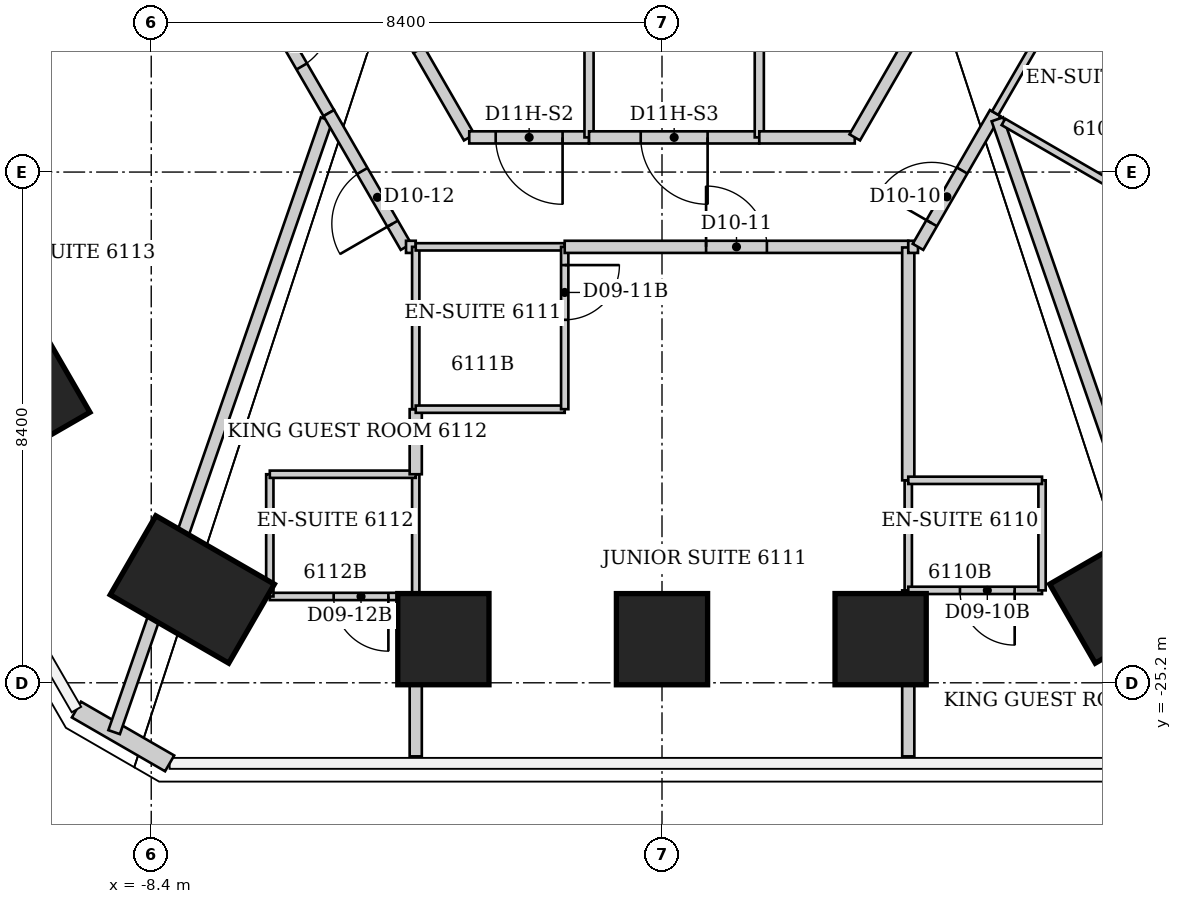
"""IFC4 building model, lengths in metres.
Left out: names, types, materials, properties, quantities, classifications, styles, units other than length and angle.
Written with IfcOpenShell. Run it as: python <this file> out.ifc"""

import sys

from ifc_helpers import new_model, si_unit, direction, frame, frame_2d, origin, origin_2d, place, context, subcontext, project, spatial, rectangle, extrude, element, fill, save


model = new_model("IFC4")
c1 = context("Model", 3, precision=1e-05, world=origin(), true_north=direction((0.0, 1.0)))
c2 = subcontext(c1, "Body", "Model", "MODEL_VIEW")
j1 = project(units=[si_unit("LENGTHUNIT", "METRE"), si_unit("PLANEANGLEUNIT", "RADIAN")], contexts=[c1])
p1 = place(None, origin())
s1 = spatial("IfcSite", under=j1, at=p1, CompositionType="ELEMENT")
p2 = place(p1, origin())
s2 = spatial("IfcBuilding", under=s1, at=p2, CompositionType="ELEMENT")
p3 = place(p2, frame((0.0, 0.0, 244.0)))
s3 = spatial("IfcBuildingStorey", under=s2, at=p3, CompositionType="ELEMENT", Elevation=244.0)
p4 = place(p3, frame((7.725, -23.665, 0.0), z_axis=(-0.022045010904, 0.06754488806, 0.997472659069), x_axis=(0.499636222159, -0.863441852085, 0.069511247833)))
e1 = element("IfcColumn", 1, at=p4, inside=s3, PredefinedType="COLUMN", context=c2, shape_type="SweptSolid", body=[
    extrude(rectangle(XDim=1.5, YDim=2.25, at=origin_2d()), origin(), (0.0, 0.0, 1.0), 3.81),
])
p5 = place(p3, frame((3.595, -24.482, 0.0), z_axis=(-0.009998694988, 0.068132133153, 0.997626201806), x_axis=(-0.000785320082, -0.997676301199, 0.068127683793)))
e2 = element("IfcColumn", 2, at=p5, inside=s3, PredefinedType="COLUMN", context=c2, shape_type="SweptSolid", body=[
    extrude(rectangle(XDim=1.5, YDim=1.5, at=origin_2d()), origin(), (0.0, 0.0, 1.0), 3.809),
])
p6 = place(p3, frame((0.0, -24.483, 0.0), z_axis=(0.0, 0.068135539126, 0.997676073838), x_axis=(0.0, -0.997676073838, 0.068135539126)))
e3 = element("IfcColumn", 3, at=p6, inside=s3, PredefinedType="COLUMN", context=c2, shape_type="SweptSolid", body=[
    extrude(rectangle(XDim=1.5, YDim=1.5, at=origin_2d()), origin(), (0.0, 0.0, 1.0), 3.809),
])
p7 = place(p3, frame((-3.595, -24.482, 0.0), z_axis=(0.009998694988, 0.068132133153, 0.997626201806), x_axis=(0.000785320082, -0.997676301199, 0.068127683793)))
e4 = element("IfcColumn", 4, at=p7, inside=s3, PredefinedType="COLUMN", context=c2, shape_type="SweptSolid", body=[
    extrude(rectangle(XDim=1.5, YDim=1.5, at=origin_2d()), origin(), (0.0, 0.0, 1.0), 3.809),
])
p8 = place(p3, frame((-7.725, -23.665, 0.0), z_axis=(0.022045010904, 0.06754488806, 0.997472659069), x_axis=(-0.499636222159, -0.863441852085, 0.069511247833)))
e5 = element("IfcColumn", 5, at=p8, inside=s3, PredefinedType="COLUMN", context=c2, shape_type="SweptSolid", body=[
    extrude(rectangle(XDim=1.5, YDim=2.25, at=origin_2d()), origin(), (0.0, 0.0, 1.0), 3.81),
])
p9 = place(p3, frame((-10.433, -20.476, 0.0), z_axis=(0.02955498868, 0.05795598648, 0.997881559242), x_axis=(-0.865880688817, -0.49727005386, 0.054526381384)))
e6 = element("IfcColumn", 6, at=p9, inside=s3, PredefinedType="COLUMN", context=c2, shape_type="SweptSolid", body=[
    extrude(rectangle(XDim=1.5, YDim=1.5, at=origin_2d()), origin(), (0.0, 0.0, 1.0), 3.808),
])
p10 = place(p3, frame((-8.097, -26.525, 0.0), z_axis=(0.0, 0.0, 1.0), x_axis=(-0.866036293601, 0.499981137809, 0.0)))
e7 = element("IfcWall", 7, at=p10, inside=s3, PredefinedType="SOLIDWALL", context=c2, shape_type="SweptSolid", body=[
    extrude(rectangle(XDim=1.77, YDim=0.3, at=frame_2d((0.885, 0.0))), origin(), (0.0, 0.0, 1.0), 3.64),
])
p11 = place(p3, frame((-9.01, -26.012, 0.0), z_axis=(0.0, 0.0, 1.0), x_axis=(0.327582991606, 0.944822408504, 0.0)))
e8 = element("IfcWall", 8, at=p11, inside=s3, PredefinedType="PARTITIONING", context=c2, shape_type="SweptSolid", body=[
    extrude(rectangle(XDim=10.667, YDim=0.2, at=frame_2d((5.333, 0.0))), origin(), (0.0, 0.0, 1.0), 3.64),
])
p12 = place(p3, frame((-6.87, -13.43, 0.0), z_axis=(0.0, 0.0, 1.0), x_axis=(0.501192399481, -0.865335876237, 0.0)))
e9 = element("IfcWall", 9, at=p12, inside=s3, PredefinedType="PARTITIONING", context=c2, shape_type="SweptSolid", body=[
    extrude(rectangle(XDim=2.774, YDim=0.2, at=frame_2d((1.387, 0.0))), origin(), (0.0, 0.0, 1.0), 3.64),
])
p13 = place(p12, frame((0.887, 0.0, 0.0)))
e10 = element("IfcOpeningElement", 10, at=p13, cuts=e9, PredefinedType="OPENING", context=c2, shape_type="SweptSolid", body=[
    extrude(rectangle(XDim=1.0, YDim=2.13, at=frame_2d((0.5, 1.065))), frame((0.0, 0.1, 0.0), z_axis=(0.0, -1.0, 0.0), x_axis=(1.0, 0.0, 0.0)), (0.0, 0.0, 1.0), 0.2),
])
p14 = place(p3, frame((-6.45, -23.78, 0.0), z_axis=(0.0, 0.0, 1.0), x_axis=(1.0, 0.0, 0.0)))
e11 = element("IfcWall", 11, at=p14, inside=s3, PredefinedType="PARTITIONING", context=c2, shape_type="SweptSolid", body=[
    extrude(rectangle(XDim=2.4, YDim=0.12, at=frame_2d((1.2, 0.0))), origin(), (0.0, 0.0, 1.0), 2.14),
])
p15 = place(p14, frame((1.05, 0.0, 0.0)))
e12 = element("IfcOpeningElement", 12, at=p15, cuts=e11, PredefinedType="OPENING", context=c2, shape_type="SweptSolid", body=[
    extrude(rectangle(XDim=0.9, YDim=2.03, at=frame_2d((0.45, 1.015))), frame((0.0, 0.06, 0.0), z_axis=(0.0, -1.0, 0.0), x_axis=(1.0, 0.0, 0.0)), (0.0, 0.0, 1.0), 0.12),
])
p16 = place(p3, frame((-6.45, -21.77, 0.0), z_axis=(0.0, 0.0, 1.0), x_axis=(0.0, -1.0, 0.0)))
e13 = element("IfcWall", 13, at=p16, inside=s3, PredefinedType="PARTITIONING", context=c2, shape_type="SweptSolid", body=[
    extrude(rectangle(XDim=2.01, YDim=0.12, at=frame_2d((1.005, 0.0))), origin(), (0.0, 0.0, 1.0), 3.64),
])
p17 = place(p3, frame((-5.48, -15.83, 0.0), z_axis=(0.0, 0.0, 1.0), x_axis=(0.499963722229, -0.866046347752, 0.0)))
e14 = element("IfcWall", 14, at=p17, inside=s3, PredefinedType="PARTITIONING", context=c2, shape_type="SweptSolid", body=[
    extrude(rectangle(XDim=2.54, YDim=0.2, at=frame_2d((1.27, 0.0))), origin(), (0.0, 0.0, 1.0), 3.64),
])
p18 = place(p17, frame((1.1, 0.0, 0.0)))
e15 = element("IfcOpeningElement", 15, at=p18, cuts=e14, PredefinedType="OPENING", context=c2, shape_type="SweptSolid", body=[
    extrude(rectangle(XDim=1.0, YDim=2.13, at=frame_2d((0.5, 1.065))), frame((0.0, 0.1, 0.0), z_axis=(0.0, -1.0, 0.0), x_axis=(1.0, 0.0, 0.0)), (0.0, 0.0, 1.0), 0.2),
])
p19 = place(p3, frame((-4.21, -18.03, 0.0), z_axis=(0.0, 0.0, 1.0), x_axis=(1.0, 0.0, 0.0)))
e16 = element("IfcWall", 16, at=p19, inside=s3, PredefinedType="PARTITIONING", context=c2, shape_type="SweptSolid", body=[
    extrude(rectangle(XDim=0.16, YDim=0.2, at=frame_2d((0.08, 0.0))), origin(), (0.0, 0.0, 1.0), 3.64),
])
p20 = place(p3, frame((-4.05, -26.41, 0.0), z_axis=(0.0, 0.0, 1.0), x_axis=(0.0, 1.0, 0.0)))
e17 = element("IfcWall", 17, at=p20, inside=s3, PredefinedType="PARTITIONING", context=c2, shape_type="SweptSolid", body=[
    extrude(rectangle(XDim=2.63, YDim=0.2, at=frame_2d((1.315, 0.0))), origin(), (0.0, 0.0, 1.0), 3.64),
])
p21 = place(p3, frame((-4.05, -23.78, 0.0), z_axis=(0.0, 0.0, 1.0), x_axis=(0.0, 1.0, 0.0)))
e18 = element("IfcWall", 18, at=p21, inside=s3, PredefinedType="PARTITIONING", context=c2, shape_type="SweptSolid", body=[
    extrude(rectangle(XDim=2.01, YDim=0.12, at=frame_2d((1.005, 0.0))), origin(), (0.0, 0.0, 1.0), 3.64),
])
p22 = place(p3, frame((-4.05, -21.77, 0.0), z_axis=(0.0, 0.0, 1.0), x_axis=(-1.0, 0.0, 0.0)))
e19 = element("IfcWall", 19, at=p22, inside=s3, PredefinedType="PARTITIONING", context=c2, shape_type="SweptSolid", body=[
    extrude(rectangle(XDim=2.4, YDim=0.12, at=frame_2d((1.2, 0.0))), origin(), (0.0, 0.0, 1.0), 3.64),
])
p23 = place(p3, frame((-4.05, -21.77, 0.0), z_axis=(0.0, 0.0, 1.0), x_axis=(0.0, 1.0, 0.0)))
e20 = element("IfcWall", 20, at=p23, inside=s3, PredefinedType="PARTITIONING", context=c2, shape_type="SweptSolid", body=[
    extrude(rectangle(XDim=1.07, YDim=0.2, at=frame_2d((0.535, 0.0))), origin(), (0.0, 0.0, 1.0), 3.64),
])
p24 = place(p3, frame((-4.05, -20.7, 0.0), z_axis=(0.0, 0.0, 1.0), x_axis=(0.0, 1.0, 0.0)))
e21 = element("IfcWall", 21, at=p24, inside=s3, PredefinedType="PARTITIONING", context=c2, shape_type="SweptSolid", body=[
    extrude(rectangle(XDim=2.67, YDim=0.12, at=frame_2d((1.335, 0.0))), origin(), (0.0, 0.0, 1.0), 3.64),
])
for number, where, z_axis, x_axis in (
    (22, (-4.05, -20.7, 0.0), (0.0, 0.0, 1.0), (1.0, 0.0, 0.0)),
    (23, (-4.05, -18.03, 0.0), (0.0, 0.0, 1.0), (1.0, 0.0, 0.0)),
):
    element("IfcWall", number, at=place(p3, frame(where, z_axis=z_axis, x_axis=x_axis)), inside=s3, PredefinedType="PARTITIONING", context=c2, shape_type="SweptSolid", body=[
        extrude(rectangle(XDim=2.45, YDim=0.12, at=frame_2d((1.225, 0.0))), origin(), (0.0, 0.0, 1.0), 3.64),
    ])
p25 = place(p3, frame((-4.0, -14.79, 0.0), z_axis=(0.0, 0.0, 1.0), x_axis=(-0.499916512745, 0.866073599808, 0.0)))
e24 = element("IfcWall", 24, at=p25, inside=s3, PredefinedType="PARTITIONING", context=c2, shape_type="SweptSolid", body=[
    extrude(rectangle(XDim=8.821, YDim=0.2, at=frame_2d((4.411, 0.0))), origin(), (0.0, 0.0, 1.0), 3.64),
])
p26 = place(p25, frame((3.861, 0.0, 0.0)))
e25 = element("IfcOpeningElement", 25, at=p26, cuts=e24, PredefinedType="OPENING", context=c2, shape_type="SweptSolid", body=[
    extrude(rectangle(XDim=1.1, YDim=2.2, at=frame_2d((0.55, 1.1))), frame((0.0, 0.1, 0.0), z_axis=(0.0, -1.0, 0.0), x_axis=(1.0, 0.0, 0.0)), (0.0, 0.0, 1.0), 0.2),
])
p27 = place(p3, frame((-3.17, -16.23, 0.0), z_axis=(0.0, 0.0, 1.0), x_axis=(-0.499425709803, 0.866356716594, 0.0)))
e26 = element("IfcWall", 26, at=p27, inside=s3, PredefinedType="PARTITIONING", context=c2, shape_type="SweptSolid", body=[
    extrude(rectangle(XDim=1.662, YDim=0.2, at=frame_2d((0.831, 0.0))), origin(), (0.0, 0.0, 1.0), 3.64),
])
p28 = place(p3, frame((-1.6, -20.7, 0.0), z_axis=(0.0, 0.0, 1.0), x_axis=(0.0, 1.0, 0.0)))
e27 = element("IfcWall", 27, at=p28, inside=s3, PredefinedType="PARTITIONING", context=c2, shape_type="SweptSolid", body=[
    extrude(rectangle(XDim=2.67, YDim=0.12, at=frame_2d((1.335, 0.0))), origin(), (0.0, 0.0, 1.0), 3.64),
])
p29 = place(p28, frame((1.47, 0.0, 0.0)))
e28 = element("IfcOpeningElement", 28, at=p29, cuts=e27, PredefinedType="OPENING", context=c2, shape_type="SweptSolid", body=[
    extrude(rectangle(XDim=0.9, YDim=2.03, at=frame_2d((0.45, 1.015))), frame((0.0, 0.06, 0.0), z_axis=(0.0, -1.0, 0.0), x_axis=(1.0, 0.0, 0.0)), (0.0, 0.0, 1.0), 0.12),
])
p30 = place(p3, frame((-1.6, -18.03, 0.0), z_axis=(0.0, 0.0, 1.0), x_axis=(1.0, 0.0, 0.0)))
e29 = element("IfcWall", 29, at=p30, inside=s3, PredefinedType="PARTITIONING", context=c2, shape_type="SweptSolid", body=[
    extrude(rectangle(XDim=5.65, YDim=0.2, at=frame_2d((2.825, 0.0))), origin(), (0.0, 0.0, 1.0), 3.64),
])
p31 = place(p30, frame((2.325, 0.0, 0.0)))
e30 = element("IfcOpeningElement", 30, at=p31, cuts=e29, PredefinedType="OPENING", context=c2, shape_type="SweptSolid", body=[
    extrude(rectangle(XDim=1.0, YDim=2.13, at=frame_2d((0.5, 1.065))), frame((0.0, 0.1, 0.0), z_axis=(0.0, -1.0, 0.0), x_axis=(1.0, 0.0, 0.0)), (0.0, 0.0, 1.0), 0.2),
])
p32 = place(p3, frame((-1.2, -16.23, 0.0), z_axis=(0.0, 0.0, 1.0), x_axis=(-1.0, 0.0, 0.0)))
e31 = element("IfcWall", 31, at=p32, inside=s3, PredefinedType="PARTITIONING", context=c2, shape_type="SweptSolid", body=[
    extrude(rectangle(XDim=1.97, YDim=0.2, at=frame_2d((0.985, 0.0))), origin(), (0.0, 0.0, 1.0), 3.64),
])
p33 = place(p32, frame((0.435, 0.0, 0.0)))
e32 = element("IfcOpeningElement", 32, at=p33, cuts=e31, PredefinedType="OPENING", context=c2, shape_type="SweptSolid", body=[
    extrude(rectangle(XDim=1.1, YDim=2.2, at=frame_2d((0.55, 1.1))), frame((0.0, 0.1, 0.0), z_axis=(0.0, -1.0, 0.0), x_axis=(1.0, 0.0, 0.0)), (0.0, 0.0, 1.0), 0.2),
])
p34 = place(p3, frame((-1.2, -7.1, 0.0), z_axis=(0.0, 0.0, 1.0), x_axis=(0.0, -1.0, 0.0)))
e33 = element("IfcWall", 33, at=p34, inside=s3, PredefinedType="PARTITIONING", context=c2, shape_type="SweptSolid", body=[
    extrude(rectangle(XDim=9.13, YDim=0.15, at=frame_2d((4.565, 0.0))), origin(), (0.0, 0.0, 1.0), 3.64),
])
p35 = place(p3, frame((1.6, -16.23, 0.0), z_axis=(0.0, 0.0, 1.0), x_axis=(-1.0, 0.0, 0.0)))
e34 = element("IfcWall", 34, at=p35, inside=s3, PredefinedType="PARTITIONING", context=c2, shape_type="SweptSolid", body=[
    extrude(rectangle(XDim=2.8, YDim=0.2, at=frame_2d((1.4, 0.0))), origin(), (0.0, 0.0, 1.0), 3.64),
])
p36 = place(p35, frame((0.85, 0.0, 0.0)))
e35 = element("IfcOpeningElement", 35, at=p36, cuts=e34, PredefinedType="OPENING", context=c2, shape_type="SweptSolid", body=[
    extrude(rectangle(XDim=1.1, YDim=2.2, at=frame_2d((0.55, 1.1))), frame((0.0, 0.1, 0.0), z_axis=(0.0, -1.0, 0.0), x_axis=(1.0, 0.0, 0.0)), (0.0, 0.0, 1.0), 0.2),
])
p37 = place(p3, frame((1.6, -7.1, 0.0), z_axis=(0.0, 0.0, 1.0), x_axis=(0.0, -1.0, 0.0)))
e36 = element("IfcWall", 36, at=p37, inside=s3, PredefinedType="PARTITIONING", context=c2, shape_type="SweptSolid", body=[
    extrude(rectangle(XDim=9.13, YDim=0.15, at=frame_2d((4.565, 0.0))), origin(), (0.0, 0.0, 1.0), 3.64),
])
p38 = place(p3, frame((3.17, -16.23, 0.0), z_axis=(0.0, 0.0, 1.0), x_axis=(-1.0, 0.0, 0.0)))
e37 = element("IfcWall", 37, at=p38, inside=s3, PredefinedType="PARTITIONING", context=c2, shape_type="SweptSolid", body=[
    extrude(rectangle(XDim=1.57, YDim=0.2, at=frame_2d((0.785, 0.0))), origin(), (0.0, 0.0, 1.0), 3.64),
])
p39 = place(p3, frame((4.05, -26.41, 0.0), z_axis=(0.0, 0.0, 1.0), x_axis=(0.0, 1.0, 0.0)))
e38 = element("IfcWall", 38, at=p39, inside=s3, PredefinedType="PARTITIONING", context=c2, shape_type="SweptSolid", body=[
    extrude(rectangle(XDim=2.73, YDim=0.2, at=frame_2d((1.365, 0.0))), origin(), (0.0, 0.0, 1.0), 3.64),
])
p40 = place(p3, frame((4.05, -23.68, 0.0), z_axis=(0.0, 0.0, 1.0), x_axis=(0.0, 1.0, 0.0)))
e39 = element("IfcWall", 39, at=p40, inside=s3, PredefinedType="PARTITIONING", context=c2, shape_type="SweptSolid", body=[
    extrude(rectangle(XDim=1.81, YDim=0.12, at=frame_2d((0.905, 0.0))), origin(), (0.0, 0.0, 1.0), 3.64),
])
p41 = place(p3, frame((4.05, -23.68, 0.0), z_axis=(0.0, 0.0, 1.0), x_axis=(1.0, 0.0, 0.0)))
e40 = element("IfcWall", 40, at=p41, inside=s3, PredefinedType="PARTITIONING", context=c2, shape_type="SweptSolid", body=[
    extrude(rectangle(XDim=2.2, YDim=0.12, at=frame_2d((1.1, 0.0))), origin(), (0.0, 0.0, 1.0), 2.14),
])
p42 = place(p41, frame((0.85, 0.0, 0.0)))
e41 = element("IfcOpeningElement", 41, at=p42, cuts=e40, PredefinedType="OPENING", context=c2, shape_type="SweptSolid", body=[
    extrude(rectangle(XDim=0.9, YDim=2.03, at=frame_2d((0.45, 1.015))), frame((0.0, 0.06, 0.0), z_axis=(0.0, -1.0, 0.0), x_axis=(1.0, 0.0, 0.0)), (0.0, 0.0, 1.0), 0.12),
])
p43 = place(p3, frame((4.05, -21.87, 0.0), z_axis=(0.0, 0.0, 1.0), x_axis=(0.0, 1.0, 0.0)))
e42 = element("IfcWall", 42, at=p43, inside=s3, PredefinedType="PARTITIONING", context=c2, shape_type="SweptSolid", body=[
    extrude(rectangle(XDim=3.83, YDim=0.2, at=frame_2d((1.915, 0.0))), origin(), (0.0, 0.0, 1.0), 3.64),
])
p44 = place(p3, frame((4.05, -18.03, 0.0), z_axis=(0.0, 0.0, 1.0), x_axis=(1.0, 0.0, 0.0)))
e43 = element("IfcWall", 43, at=p44, inside=s3, PredefinedType="PARTITIONING", context=c2, shape_type="SweptSolid", body=[
    extrude(rectangle(XDim=0.16, YDim=0.2, at=frame_2d((0.08, 0.0))), origin(), (0.0, 0.0, 1.0), 3.64),
])
p45 = place(p3, frame((4.21, -18.03, 0.0), z_axis=(0.0, 0.0, 1.0), x_axis=(0.499963722229, 0.866046347752, 0.0)))
e44 = element("IfcWall", 44, at=p45, inside=s3, PredefinedType="PARTITIONING", context=c2, shape_type="SweptSolid", body=[
    extrude(rectangle(XDim=2.54, YDim=0.2, at=frame_2d((1.27, 0.0))), origin(), (0.0, 0.0, 1.0), 3.64),
])
p46 = place(p45, frame((0.45, 0.0, 0.0)))
e45 = element("IfcOpeningElement", 45, at=p46, cuts=e44, PredefinedType="OPENING", context=c2, shape_type="SweptSolid", body=[
    extrude(rectangle(XDim=1.0, YDim=2.13, at=frame_2d((0.5, 1.065))), frame((0.0, 0.1, 0.0), z_axis=(0.0, -1.0, 0.0), x_axis=(1.0, 0.0, 0.0)), (0.0, 0.0, 1.0), 0.2),
])
p47 = place(p3, frame((5.48, -15.83, 0.0), z_axis=(0.0, 0.0, 1.0), x_axis=(0.501296828005, 0.865275384044, 0.0)))
e46 = element("IfcWall", 46, at=p47, inside=s3, PredefinedType="PARTITIONING", context=c2, shape_type="SweptSolid", body=[
    extrude(rectangle(XDim=2.438, YDim=0.12, at=frame_2d((1.219, 0.0))), origin(), (0.0, 0.0, 1.0), 3.64),
])
p48 = place(p3, frame((5.515, -15.932, 0.0), z_axis=(0.0, 0.0, 1.0), x_axis=(0.327594697431, -0.944818349851, 0.0)))
e47 = element("IfcWall", 47, at=p48, inside=s3, PredefinedType="PARTITIONING", context=c2, shape_type="SweptSolid", body=[
    extrude(rectangle(XDim=10.668, YDim=0.2, at=frame_2d((5.334, 0.0))), origin(), (0.0, 0.0, 1.0), 3.64),
])
p49 = place(p3, frame((5.615, -15.975, 0.0), z_axis=(0.0, 0.0, 1.0), x_axis=(0.864873056518, -0.501990633487, 0.0)))
e48 = element("IfcWall", 48, at=p49, inside=s3, PredefinedType="PARTITIONING", context=c2, shape_type="SweptSolid", body=[
    extrude(rectangle(XDim=2.48, YDim=0.12, at=frame_2d((1.24, 0.0))), origin(), (0.0, 0.0, 1.0), 3.64),
])
p50 = place(p3, frame((6.25, -23.68, 0.0), z_axis=(0.0, 0.0, 1.0), x_axis=(0.0, 1.0, 0.0)))
e49 = element("IfcWall", 49, at=p50, inside=s3, PredefinedType="PARTITIONING", context=c2, shape_type="SweptSolid", body=[
    extrude(rectangle(XDim=1.81, YDim=0.12, at=frame_2d((0.905, 0.0))), origin(), (0.0, 0.0, 1.0), 3.64),
])
p51 = place(p3, frame((6.25, -21.87, 0.0), z_axis=(0.0, 0.0, 1.0), x_axis=(-1.0, 0.0, 0.0)))
e50 = element("IfcWall", 50, at=p51, inside=s3, PredefinedType="PARTITIONING", context=c2, shape_type="SweptSolid", body=[
    extrude(rectangle(XDim=2.2, YDim=0.12, at=frame_2d((1.1, 0.0))), origin(), (0.0, 0.0, 1.0), 3.64),
])
p52 = place(p3, frame((8.41, -7.15, 0.0), z_axis=(0.0, 0.0, 1.0), x_axis=(-0.499828628176, -0.866124322748, 0.0)))
e51 = element("IfcWall", 51, at=p52, inside=s3, PredefinedType="PARTITIONING", context=c2, shape_type="SweptSolid", body=[
    extrude(rectangle(XDim=10.484, YDim=0.2, at=frame_2d((5.242, 0.0))), origin(), (0.0, 0.0, 1.0), 3.64),
])
p53 = place(p52, frame((4.692, 0.0, 0.0)))
e52 = element("IfcOpeningElement", 52, at=p53, cuts=e51, PredefinedType="OPENING", context=c2, shape_type="SweptSolid", body=[
    extrude(rectangle(XDim=1.1, YDim=2.2, at=frame_2d((0.55, 1.1))), frame((0.0, 0.1, 0.0), z_axis=(0.0, -1.0, 0.0), x_axis=(1.0, 0.0, 0.0)), (0.0, 0.0, 1.0), 0.2),
])
p54 = place(p3, frame((9.01, -15.05, 0.0), z_axis=(0.0, 0.0, 1.0), x_axis=(-0.866615255992, 0.498976951453, 0.0)))
e53 = element("IfcWall", 53, at=p54, inside=s3, PredefinedType="PARTITIONING", context=c2, shape_type="SweptSolid", body=[
    extrude(rectangle(XDim=2.666, YDim=0.12, at=frame_2d((1.333, 0.0))), origin(), (0.0, 0.0, 1.0), 3.64),
])
p55 = place(p54, frame((1.466, 0.0, 0.0)))
e54 = element("IfcOpeningElement", 54, at=p55, cuts=e53, PredefinedType="OPENING", context=c2, shape_type="SweptSolid", body=[
    extrude(rectangle(XDim=0.9, YDim=2.03, at=frame_2d((0.45, 1.015))), frame((0.0, 0.06, 0.0), z_axis=(0.0, -1.0, 0.0), x_axis=(1.0, 0.0, 0.0)), (0.0, 0.0, 1.0), 0.12),
])
p56 = place(p46, origin())
e55 = element("IfcDoor", 55, at=p56, inside=s3, OperationType="SINGLE_SWING_LEFT", PredefinedType="DOOR", context=c2, shape_type="SweptSolid", body=[
    extrude(rectangle(XDim=1.0, YDim=2.13, at=frame_2d((0.5, 1.065))), frame((0.0, 0.025, 0.0), z_axis=(0.0, -1.0, 0.0), x_axis=(1.0, 0.0, 0.0)), (0.0, 0.0, 1.0), 0.05),
])
fill(e45, e55)
p57 = place(p42, origin())
e56 = element("IfcDoor", 56, at=p57, inside=s3, OperationType="SINGLE_SWING_RIGHT", PredefinedType="DOOR", context=c2, shape_type="SweptSolid", body=[
    extrude(rectangle(XDim=0.9, YDim=2.03, at=frame_2d((0.45, 1.015))), frame((0.0, 0.025, 0.0), z_axis=(0.0, -1.0, 0.0), x_axis=(1.0, 0.0, 0.0)), (0.0, 0.0, 1.0), 0.05),
])
fill(e41, e56)
p58 = place(p31, origin())
e57 = element("IfcDoor", 57, at=p58, inside=s3, OperationType="SINGLE_SWING_LEFT", PredefinedType="DOOR", context=c2, shape_type="SweptSolid", body=[
    extrude(rectangle(XDim=1.0, YDim=2.13, at=frame_2d((0.5, 1.065))), frame((0.0, 0.025, 0.0), z_axis=(0.0, -1.0, 0.0), x_axis=(1.0, 0.0, 0.0)), (0.0, 0.0, 1.0), 0.05),
])
fill(e30, e57)
p59 = place(p29, origin())
e58 = element("IfcDoor", 58, at=p59, inside=s3, OperationType="SINGLE_SWING_RIGHT", PredefinedType="DOOR", context=c2, shape_type="SweptSolid", body=[
    extrude(rectangle(XDim=0.9, YDim=2.03, at=frame_2d((0.45, 1.015))), frame((0.0, 0.025, 0.0), z_axis=(0.0, -1.0, 0.0), x_axis=(1.0, 0.0, 0.0)), (0.0, 0.0, 1.0), 0.05),
])
fill(e28, e58)
p60 = place(p18, origin())
e59 = element("IfcDoor", 59, at=p60, inside=s3, OperationType="SINGLE_SWING_RIGHT", PredefinedType="DOOR", context=c2, shape_type="SweptSolid", body=[
    extrude(rectangle(XDim=1.0, YDim=2.13, at=frame_2d((0.5, 1.065))), frame((0.0, 0.025, 0.0), z_axis=(0.0, -1.0, 0.0), x_axis=(1.0, 0.0, 0.0)), (0.0, 0.0, 1.0), 0.05),
])
fill(e15, e59)
p61 = place(p15, origin())
e60 = element("IfcDoor", 60, at=p61, inside=s3, OperationType="SINGLE_SWING_RIGHT", PredefinedType="DOOR", context=c2, shape_type="SweptSolid", body=[
    extrude(rectangle(XDim=0.9, YDim=2.03, at=frame_2d((0.45, 1.015))), frame((0.0, 0.025, 0.0), z_axis=(0.0, -1.0, 0.0), x_axis=(1.0, 0.0, 0.0)), (0.0, 0.0, 1.0), 0.05),
])
fill(e12, e60)
p62 = place(p13, origin())
e61 = element("IfcDoor", 61, at=p62, inside=s3, OperationType="SINGLE_SWING_LEFT", PredefinedType="DOOR", context=c2, shape_type="SweptSolid", body=[
    extrude(rectangle(XDim=1.0, YDim=2.13, at=frame_2d((0.5, 1.065))), frame((0.0, 0.025, 0.0), z_axis=(0.0, -1.0, 0.0), x_axis=(1.0, 0.0, 0.0)), (0.0, 0.0, 1.0), 0.05),
])
fill(e10, e61)
p63 = place(p33, origin())
e62 = element("IfcDoor", 62, at=p63, inside=s3, OperationType="SINGLE_SWING_LEFT", PredefinedType="DOOR", context=c2, shape_type="SweptSolid", body=[
    extrude(rectangle(XDim=1.1, YDim=2.2, at=frame_2d((0.55, 1.1))), frame((0.0, 0.025, 0.0), z_axis=(0.0, -1.0, 0.0), x_axis=(1.0, 0.0, 0.0)), (0.0, 0.0, 1.0), 0.05),
])
fill(e32, e62)
p64 = place(p36, origin())
e63 = element("IfcDoor", 63, at=p64, inside=s3, OperationType="SINGLE_SWING_LEFT", PredefinedType="DOOR", context=c2, shape_type="SweptSolid", body=[
    extrude(rectangle(XDim=1.1, YDim=2.2, at=frame_2d((0.55, 1.1))), frame((0.0, 0.025, 0.0), z_axis=(0.0, -1.0, 0.0), x_axis=(1.0, 0.0, 0.0)), (0.0, 0.0, 1.0), 0.05),
])
fill(e35, e63)
save(model, sys.argv[1])
